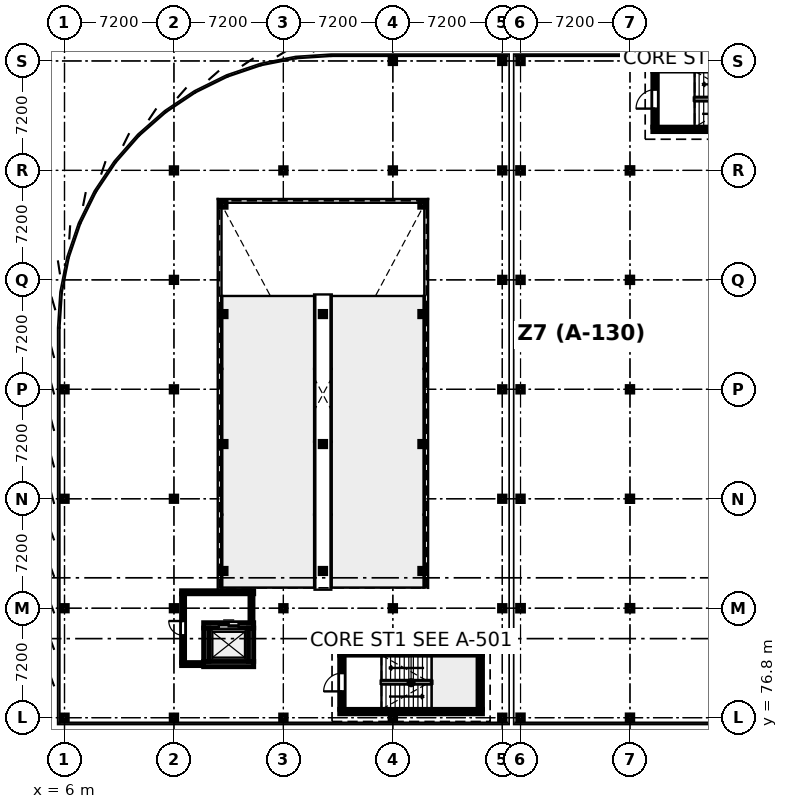
"""IFC4 building model, lengths in metres.
Left out: names, types, materials, properties, quantities, classifications, styles, units other than length and angle.
Written with IfcOpenShell. Run it as: python <this file> out.ifc"""

import sys

from ifc_helpers import new_model, si_unit, direction, frame, frame_2d, origin, origin_2d, place, context, subcontext, project, spatial, rectangle, i_section, extrude, element, fill, save


model = new_model("IFC4")
c1 = context("Model", 3, precision=1e-05, world=origin(), true_north=direction((0.0, 1.0)))
c2 = subcontext(c1, "Body", "Model", "MODEL_VIEW")
j1 = project(units=[si_unit("LENGTHUNIT", "METRE"), si_unit("PLANEANGLEUNIT", "RADIAN")], contexts=[c1])
p1 = place(None, origin())
s1 = spatial("IfcSite", under=j1, at=p1, CompositionType="ELEMENT")
p2 = place(p1, origin())
s2 = spatial("IfcBuilding", under=s1, at=p2, CompositionType="ELEMENT")
p3 = place(p2, frame((0.0, 0.0, 9.3)))
s3 = spatial("IfcBuildingStorey", under=s2, at=p3, CompositionType="ELEMENT", Elevation=9.3)
for number, where, z_axis, x_axis in (
    (1, (6.0, 76.8, 0.0), (0.0, 0.0, 1.0), (1.0, 0.0, 0.0)),
    (2, (6.0, 84.0, 0.0), (0.0, 0.0, 1.0), (1.0, 0.0, 0.0)),
    (3, (6.0, 91.2, 0.0), (0.0, 0.0, 1.0), (1.0, 0.0, 0.0)),
    (4, (6.0, 98.4, 0.0), (0.0, 0.0, 1.0), (1.0, 0.0, 0.0)),
    (5, (13.2, 76.8, 0.0), (0.0, 0.0, 1.0), (1.0, 0.0, 0.0)),
    (6, (13.2, 84.0, 0.0), (0.0, 0.0, 1.0), (1.0, 0.0, 0.0)),
    (7, (13.2, 91.2, 0.0), (0.0, 0.0, 1.0), (1.0, 0.0, 0.0)),
    (8, (13.2, 98.4, 0.0), (0.0, 0.0, 1.0), (1.0, 0.0, 0.0)),
    (9, (13.2, 105.6, 0.0), (0.0, 0.0, 1.0), (1.0, 0.0, 0.0)),
    (10, (13.2, 112.8, 0.0), (0.0, 0.0, 1.0), (1.0, 0.0, 0.0)),
    (11, (20.4, 76.8, 0.0), (0.0, 0.0, 1.0), (1.0, 0.0, 0.0)),
    (12, (20.4, 84.0, 0.0), (0.0, 0.0, 1.0), (1.0, 0.0, 0.0)),
    (13, (20.4, 112.8, 0.0), (0.0, 0.0, 1.0), (1.0, 0.0, 0.0)),
    (14, (27.6, 76.8, 0.0), (0.0, 0.0, 1.0), (1.0, 0.0, 0.0)),
    (15, (27.6, 84.0, 0.0), (0.0, 0.0, 1.0), (1.0, 0.0, 0.0)),
    (16, (27.6, 112.8, 0.0), (0.0, 0.0, 1.0), (1.0, 0.0, 0.0)),
    (17, (27.6, 120.0, 0.0), (0.0, 0.0, 1.0), (1.0, 0.0, 0.0)),
    (18, (34.8, 76.8, 0.0), (0.0, 0.0, 1.0), (1.0, 0.0, 0.0)),
    (19, (34.8, 84.0, 0.0), (0.0, 0.0, 1.0), (1.0, 0.0, 0.0)),
    (20, (34.8, 91.2, 0.0), (0.0, 0.0, 1.0), (1.0, 0.0, 0.0)),
    (21, (34.8, 98.4, 0.0), (0.0, 0.0, 1.0), (1.0, 0.0, 0.0)),
    (22, (34.8, 105.6, 0.0), (0.0, 0.0, 1.0), (1.0, 0.0, 0.0)),
    (23, (34.8, 112.8, 0.0), (0.0, 0.0, 1.0), (1.0, 0.0, 0.0)),
    (24, (34.8, 120.0, 0.0), (0.0, 0.0, 1.0), (1.0, 0.0, 0.0)),
):
    element("IfcColumn", number, at=place(p3, frame(where, z_axis=z_axis, x_axis=x_axis)), inside=s3, PredefinedType="COLUMN", context=c2, shape_type="SweptSolid", body=[
        extrude(i_section(OverallWidth=0.371, OverallDepth=0.363, WebThickness=0.013, FlangeThickness=0.022, FilletRadius=0.015, at=origin_2d()), origin(), (0.0, 0.0, 1.0), 3.9),
    ])
for number, where, z_axis, x_axis in (
    (25, (16.45, 86.45, 0.0), (0.0, 0.0, 1.0), (1.0, 0.0, 0.0)),
    (26, (23.0, 86.45, 0.0), (0.0, 0.0, 1.0), (1.0, 0.0, 0.0)),
    (27, (29.55, 86.45, 0.0), (0.0, 0.0, 1.0), (1.0, 0.0, 0.0)),
    (28, (16.45, 94.8, 0.0), (0.0, 0.0, 1.0), (1.0, 0.0, 0.0)),
    (29, (23.0, 94.8, 0.0), (0.0, 0.0, 1.0), (1.0, 0.0, 0.0)),
    (30, (29.55, 94.8, 0.0), (0.0, 0.0, 1.0), (1.0, 0.0, 0.0)),
    (31, (16.45, 103.35, 0.0), (0.0, 0.0, 1.0), (1.0, 0.0, 0.0)),
    (32, (23.0, 103.35, 0.0), (0.0, 0.0, 1.0), (1.0, 0.0, 0.0)),
    (33, (29.55, 103.35, 0.0), (0.0, 0.0, 1.0), (1.0, 0.0, 0.0)),
    (34, (16.45, 110.55, 0.0), (0.0, 0.0, 1.0), (1.0, 0.0, 0.0)),
    (35, (29.55, 110.55, 0.0), (0.0, 0.0, 1.0), (1.0, 0.0, 0.0)),
):
    element("IfcColumn", number, at=place(p3, frame(where, z_axis=z_axis, x_axis=x_axis)), inside=s3, PredefinedType="COLUMN", context=c2, shape_type="SweptSolid", body=[
        extrude(i_section(OverallWidth=0.368, OverallDepth=0.356, WebThickness=0.011, FlangeThickness=0.018, FilletRadius=0.015, at=origin_2d()), origin(), (0.0, 0.0, 1.0), 3.9),
    ])
p4 = place(p3, frame((36.0, 76.8, 0.0), z_axis=(0.0, 0.0, 1.0), x_axis=(1.0, 0.0, 0.0)))
e36 = element("IfcColumn", 36, at=p4, inside=s3, PredefinedType="COLUMN", context=c2, shape_type="SweptSolid", body=[
    extrude(i_section(OverallWidth=0.373, OverallDepth=0.373, WebThickness=0.016, FlangeThickness=0.026, FilletRadius=0.015, at=origin_2d()), origin(), (0.0, 0.0, 1.0), 3.9),
])
p5 = place(p3, frame((36.0, 84.0, 0.0), z_axis=(0.0, 0.0, 1.0), x_axis=(1.0, 0.0, 0.0)))
e37 = element("IfcColumn", 37, at=p5, inside=s3, PredefinedType="COLUMN", context=c2, shape_type="SweptSolid", body=[
    extrude(i_section(OverallWidth=0.396, OverallDepth=0.381, WebThickness=0.019, FlangeThickness=0.03, FilletRadius=0.015, at=origin_2d()), origin(), (0.0, 0.0, 1.0), 3.9),
])
for number, where, z_axis, x_axis in (
    (38, (36.0, 91.2, 0.0), (0.0, 0.0, 1.0), (1.0, 0.0, 0.0)),
    (39, (36.0, 98.4, 0.0), (0.0, 0.0, 1.0), (1.0, 0.0, 0.0)),
    (40, (36.0, 105.6, 0.0), (0.0, 0.0, 1.0), (1.0, 0.0, 0.0)),
):
    element("IfcColumn", number, at=place(p3, frame(where, z_axis=z_axis, x_axis=x_axis)), inside=s3, PredefinedType="COLUMN", context=c2, shape_type="SweptSolid", body=[
        extrude(i_section(OverallWidth=0.373, OverallDepth=0.373, WebThickness=0.016, FlangeThickness=0.026, FilletRadius=0.015, at=origin_2d()), origin(), (0.0, 0.0, 1.0), 3.9),
    ])
p6 = place(p3, frame((36.0, 112.8, 0.0), z_axis=(0.0, 0.0, 1.0), x_axis=(1.0, 0.0, 0.0)))
e41 = element("IfcColumn", 41, at=p6, inside=s3, PredefinedType="COLUMN", context=c2, shape_type="SweptSolid", body=[
    extrude(i_section(OverallWidth=0.396, OverallDepth=0.381, WebThickness=0.019, FlangeThickness=0.03, FilletRadius=0.015, at=origin_2d()), origin(), (0.0, 0.0, 1.0), 3.9),
])
for number, where, z_axis, x_axis in (
    (42, (36.0, 120.0, 0.0), (0.0, 0.0, 1.0), (1.0, 0.0, 0.0)),
    (43, (43.2, 76.8, 0.0), (0.0, 0.0, 1.0), (1.0, 0.0, 0.0)),
):
    element("IfcColumn", number, at=place(p3, frame(where, z_axis=z_axis, x_axis=x_axis)), inside=s3, PredefinedType="COLUMN", context=c2, shape_type="SweptSolid", body=[
        extrude(i_section(OverallWidth=0.373, OverallDepth=0.373, WebThickness=0.016, FlangeThickness=0.026, FilletRadius=0.015, at=origin_2d()), origin(), (0.0, 0.0, 1.0), 3.9),
    ])
p7 = place(p3, frame((43.2, 84.0, 0.0), z_axis=(0.0, 0.0, 1.0), x_axis=(1.0, 0.0, 0.0)))
e44 = element("IfcColumn", 44, at=p7, inside=s3, PredefinedType="COLUMN", context=c2, shape_type="SweptSolid", body=[
    extrude(i_section(OverallWidth=0.396, OverallDepth=0.381, WebThickness=0.019, FlangeThickness=0.03, FilletRadius=0.015, at=origin_2d()), origin(), (0.0, 0.0, 1.0), 3.9),
])
for number, where, z_axis, x_axis in (
    (45, (43.2, 91.2, 0.0), (0.0, 0.0, 1.0), (1.0, 0.0, 0.0)),
    (46, (43.2, 98.4, 0.0), (0.0, 0.0, 1.0), (1.0, 0.0, 0.0)),
    (47, (43.2, 105.6, 0.0), (0.0, 0.0, 1.0), (1.0, 0.0, 0.0)),
):
    element("IfcColumn", number, at=place(p3, frame(where, z_axis=z_axis, x_axis=x_axis)), inside=s3, PredefinedType="COLUMN", context=c2, shape_type="SweptSolid", body=[
        extrude(i_section(OverallWidth=0.373, OverallDepth=0.373, WebThickness=0.016, FlangeThickness=0.026, FilletRadius=0.015, at=origin_2d()), origin(), (0.0, 0.0, 1.0), 3.9),
    ])
p8 = place(p3, frame((43.2, 112.8, 0.0), z_axis=(0.0, 0.0, 1.0), x_axis=(1.0, 0.0, 0.0)))
e48 = element("IfcColumn", 48, at=p8, inside=s3, PredefinedType="COLUMN", context=c2, shape_type="SweptSolid", body=[
    extrude(i_section(OverallWidth=0.396, OverallDepth=0.381, WebThickness=0.019, FlangeThickness=0.03, FilletRadius=0.015, at=origin_2d()), origin(), (0.0, 0.0, 1.0), 3.9),
])
p9 = place(p3, frame((43.2, 120.0, 0.0), z_axis=(0.0, 0.0, 1.0), x_axis=(1.0, 0.0, 0.0)))
e49 = element("IfcColumn", 49, at=p9, inside=s3, PredefinedType="COLUMN", context=c2, shape_type="SweptSolid", body=[
    extrude(i_section(OverallWidth=0.373, OverallDepth=0.373, WebThickness=0.016, FlangeThickness=0.026, FilletRadius=0.015, at=origin_2d()), origin(), (0.0, 0.0, 1.0), 3.9),
])
for number, where, z_axis, x_axis in (
    (50, (33.5, 77.2, 0.0), (0.0, 0.0, 1.0), (-1.0, 0.0, 0.0)),
    (51, (24.1, 81.06, 0.0), (0.0, 0.0, 1.0), (1.0, 0.0, 0.0)),
):
    element("IfcWall", number, at=place(p3, frame(where, z_axis=z_axis, x_axis=x_axis)), inside=s3, PredefinedType="SOLIDWALL", context=c2, shape_type="SweptSolid", body=[
        extrude(rectangle(XDim=9.4, YDim=0.3, at=frame_2d((4.7, 0.0))), origin(), (0.0, 0.0, 1.0), 3.65),
    ])
p10 = place(p3, frame((24.25, 77.35, 0.0), z_axis=(0.0, 0.0, 1.0), x_axis=(0.0, 1.0, 0.0)))
e52 = element("IfcWall", 52, at=p10, inside=s3, PredefinedType="SOLIDWALL", context=c2, shape_type="SweptSolid", body=[
    extrude(rectangle(XDim=3.56, YDim=0.3, at=frame_2d((1.78, 0.0))), origin(), (0.0, 0.0, 1.0), 3.65),
])
p11 = place(p10, frame((1.18, 0.0, 0.0)))
e53 = element("IfcOpeningElement", 53, at=p11, cuts=e52, PredefinedType="OPENING", context=c2, shape_type="SweptSolid", body=[
    extrude(rectangle(XDim=1.2, YDim=2.2, at=frame_2d((0.6, 1.1))), frame((0.0, 0.16, 0.0), z_axis=(0.0, -1.0, 0.0), x_axis=(1.0, 0.0, 0.0)), (0.0, 0.0, 1.0), 0.32),
])
p12 = place(p3, frame((33.35, 80.91, 0.0), z_axis=(0.0, 0.0, 1.0), x_axis=(0.0, -1.0, 0.0)))
e54 = element("IfcWall", 54, at=p12, inside=s3, PredefinedType="SOLIDWALL", context=c2, shape_type="SweptSolid", body=[
    extrude(rectangle(XDim=3.56, YDim=0.3, at=frame_2d((1.78, 0.0))), origin(), (0.0, 0.0, 1.0), 3.65),
])
for number, where, z_axis, x_axis in (
    (55, (54.1, 115.5, 0.0), (0.0, 0.0, 1.0), (-1.0, 0.0, 0.0)),
    (56, (44.7, 119.48, 0.0), (0.0, 0.0, 1.0), (1.0, 0.0, 0.0)),
):
    element("IfcWall", number, at=place(p3, frame(where, z_axis=z_axis, x_axis=x_axis)), inside=s3, PredefinedType="SOLIDWALL", context=c2, shape_type="SweptSolid", body=[
        extrude(rectangle(XDim=9.4, YDim=0.3, at=frame_2d((4.7, 0.0))), origin(), (0.0, 0.0, 1.0), 3.69),
    ])
p13 = place(p3, frame((44.85, 115.65, 0.0), z_axis=(0.0, 0.0, 1.0), x_axis=(0.0, 1.0, 0.0)))
e57 = element("IfcWall", 57, at=p13, inside=s3, PredefinedType="SOLIDWALL", context=c2, shape_type="SweptSolid", body=[
    extrude(rectangle(XDim=3.68, YDim=0.3, at=frame_2d((1.84, 0.0))), origin(), (0.0, 0.0, 1.0), 3.69),
])
p14 = place(p13, frame((1.215, 0.0, 0.0)))
e58 = element("IfcOpeningElement", 58, at=p14, cuts=e57, PredefinedType="OPENING", context=c2, shape_type="SweptSolid", body=[
    extrude(rectangle(XDim=1.25, YDim=2.2, at=frame_2d((0.625, 1.1))), frame((0.0, 0.16, 0.0), z_axis=(0.0, -1.0, 0.0), x_axis=(1.0, 0.0, 0.0)), (0.0, 0.0, 1.0), 0.32),
])
p15 = place(p3, frame((18.45, 80.325, 0.0), z_axis=(0.0, 0.0, 1.0), x_axis=(-1.0, 0.0, 0.0)))
e59 = element("IfcWall", 59, at=p15, inside=s3, PredefinedType="SHEAR", context=c2, shape_type="SweptSolid", body=[
    extrude(rectangle(XDim=3.3, YDim=0.35, at=frame_2d((1.65, 0.0))), origin(), (0.0, 0.0, 1.0), 3.65),
])
p16 = place(p3, frame((15.15, 82.875, 0.0), z_axis=(0.0, 0.0, 1.0), x_axis=(1.0, 0.0, 0.0)))
e60 = element("IfcWall", 60, at=p16, inside=s3, PredefinedType="SHEAR", context=c2, shape_type="SweptSolid", body=[
    extrude(rectangle(XDim=3.3, YDim=0.35, at=frame_2d((1.65, 0.0))), origin(), (0.0, 0.0, 1.0), 3.65),
])
p17 = place(p16, frame((1.0, 0.0, 0.0)))
e61 = element("IfcOpeningElement", 61, at=p17, cuts=e60, PredefinedType="OPENING", context=c2, shape_type="SweptSolid", body=[
    extrude(rectangle(XDim=1.3, YDim=2.2, at=frame_2d((0.65, 1.1))), frame((0.0, 0.185, 0.0), z_axis=(0.0, -1.0, 0.0), x_axis=(1.0, 0.0, 0.0)), (0.0, 0.0, 1.0), 0.37),
])
for number, where, z_axis, x_axis in (
    (62, (15.325, 80.5, 0.0), (0.0, 0.0, 1.0), (0.0, 1.0, 0.0)),
    (63, (18.275, 82.7, 0.0), (0.0, 0.0, 1.0), (0.0, -1.0, 0.0)),
):
    element("IfcWall", number, at=place(p3, frame(where, z_axis=z_axis, x_axis=x_axis)), inside=s3, PredefinedType="SHEAR", context=c2, shape_type="SweptSolid", body=[
        extrude(rectangle(XDim=2.2, YDim=0.35, at=frame_2d((1.1, 0.0))), origin(), (0.0, 0.0, 1.0), 3.65),
    ])
p18 = place(p3, frame((13.698, 85.05, 0.0), z_axis=(0.0, 0.0, 1.0), x_axis=(1.0, 0.0, 0.0)))
e64 = element("IfcWall", 64, at=p18, inside=s3, PredefinedType="PARTITIONING", context=c2, shape_type="SweptSolid", body=[
    extrude(rectangle(XDim=4.752, YDim=0.205, at=frame_2d((2.376, 0.0))), origin(), (0.0, 0.0, 1.0), 3.018),
])
p19 = place(p3, frame((15.148, 80.325, 0.0), z_axis=(0.0, 0.0, 1.0), x_axis=(-1.0, 0.0, 0.0)))
e65 = element("IfcWall", 65, at=p19, inside=s3, PredefinedType="PARTITIONING", context=c2, shape_type="SweptSolid", body=[
    extrude(rectangle(XDim=1.45, YDim=0.205, at=frame_2d((0.725, 0.0))), origin(), (0.0, 0.0, 1.0), 3.018),
])
p20 = place(p3, frame((13.8, 80.43, 0.0), z_axis=(0.0, 0.0, 1.0), x_axis=(0.0, 1.0, 0.0)))
e66 = element("IfcWall", 66, at=p20, inside=s3, PredefinedType="PARTITIONING", context=c2, shape_type="SweptSolid", body=[
    extrude(rectangle(XDim=4.516, YDim=0.205, at=frame_2d((2.258, 0.0))), origin(), (0.0, 0.0, 1.0), 3.018),
])
p21 = place(p20, frame((1.788, 0.0, 0.0)))
e67 = element("IfcOpeningElement", 67, at=p21, cuts=e66, PredefinedType="OPENING", context=c2, shape_type="SweptSolid", body=[
    extrude(rectangle(XDim=0.94, YDim=2.1, at=frame_2d((0.47, 1.05))), frame((0.0, 0.113, 0.0), z_axis=(0.0, -1.0, 0.0), x_axis=(1.0, 0.0, 0.0)), (0.0, 0.0, 1.0), 0.225),
])
p22 = place(p3, frame((18.3, 84.946, 0.0), z_axis=(0.0, 0.0, 1.0), x_axis=(0.0, -1.0, 0.0)))
e68 = element("IfcWall", 68, at=p22, inside=s3, PredefinedType="PARTITIONING", context=c2, shape_type="SweptSolid", body=[
    extrude(rectangle(XDim=1.894, YDim=0.205, at=frame_2d((0.947, 0.0))), origin(), (0.0, 0.0, 1.0), 3.018),
])
p23 = place(p11, origin())
e69 = element("IfcDoor", 69, at=p23, inside=s3, OperationType="SINGLE_SWING_LEFT", PredefinedType="DOOR", context=c2, shape_type="SweptSolid", body=[
    extrude(rectangle(XDim=1.2, YDim=2.2, at=frame_2d((0.6, 1.1))), frame((0.0, 0.025, 0.0), z_axis=(0.0, -1.0, 0.0), x_axis=(1.0, 0.0, 0.0)), (0.0, 0.0, 1.0), 0.05),
])
fill(e53, e69)
p24 = place(p14, origin())
e70 = element("IfcDoor", 70, at=p24, inside=s3, OperationType="SINGLE_SWING_LEFT", PredefinedType="DOOR", context=c2, shape_type="SweptSolid", body=[
    extrude(rectangle(XDim=1.25, YDim=2.2, at=frame_2d((0.625, 1.1))), frame((0.0, 0.025, 0.0), z_axis=(0.0, -1.0, 0.0), x_axis=(1.0, 0.0, 0.0)), (0.0, 0.0, 1.0), 0.05),
])
fill(e58, e70)
p25 = place(p17, origin())
e71 = element("IfcDoor", 71, at=p25, inside=s3, OperationType="DOUBLE_DOOR_SLIDING", PredefinedType="DOOR", context=c2, shape_type="SweptSolid", body=[
    extrude(rectangle(XDim=1.3, YDim=2.2, at=frame_2d((0.65, 1.1))), frame((0.0, 0.025, 0.0), z_axis=(0.0, -1.0, 0.0), x_axis=(1.0, 0.0, 0.0)), (0.0, 0.0, 1.0), 0.05),
])
fill(e61, e71)
p26 = place(p21, origin())
e72 = element("IfcDoor", 72, at=p26, inside=s3, OperationType="SINGLE_SWING_RIGHT", PredefinedType="DOOR", context=c2, shape_type="SweptSolid", body=[
    extrude(rectangle(XDim=0.94, YDim=2.1, at=frame_2d((0.47, 1.05))), frame((0.0, 0.025, 0.0), z_axis=(0.0, -1.0, 0.0), x_axis=(1.0, 0.0, 0.0)), (0.0, 0.0, 1.0), 0.05),
])
fill(e67, e72)
save(model, sys.argv[1])
